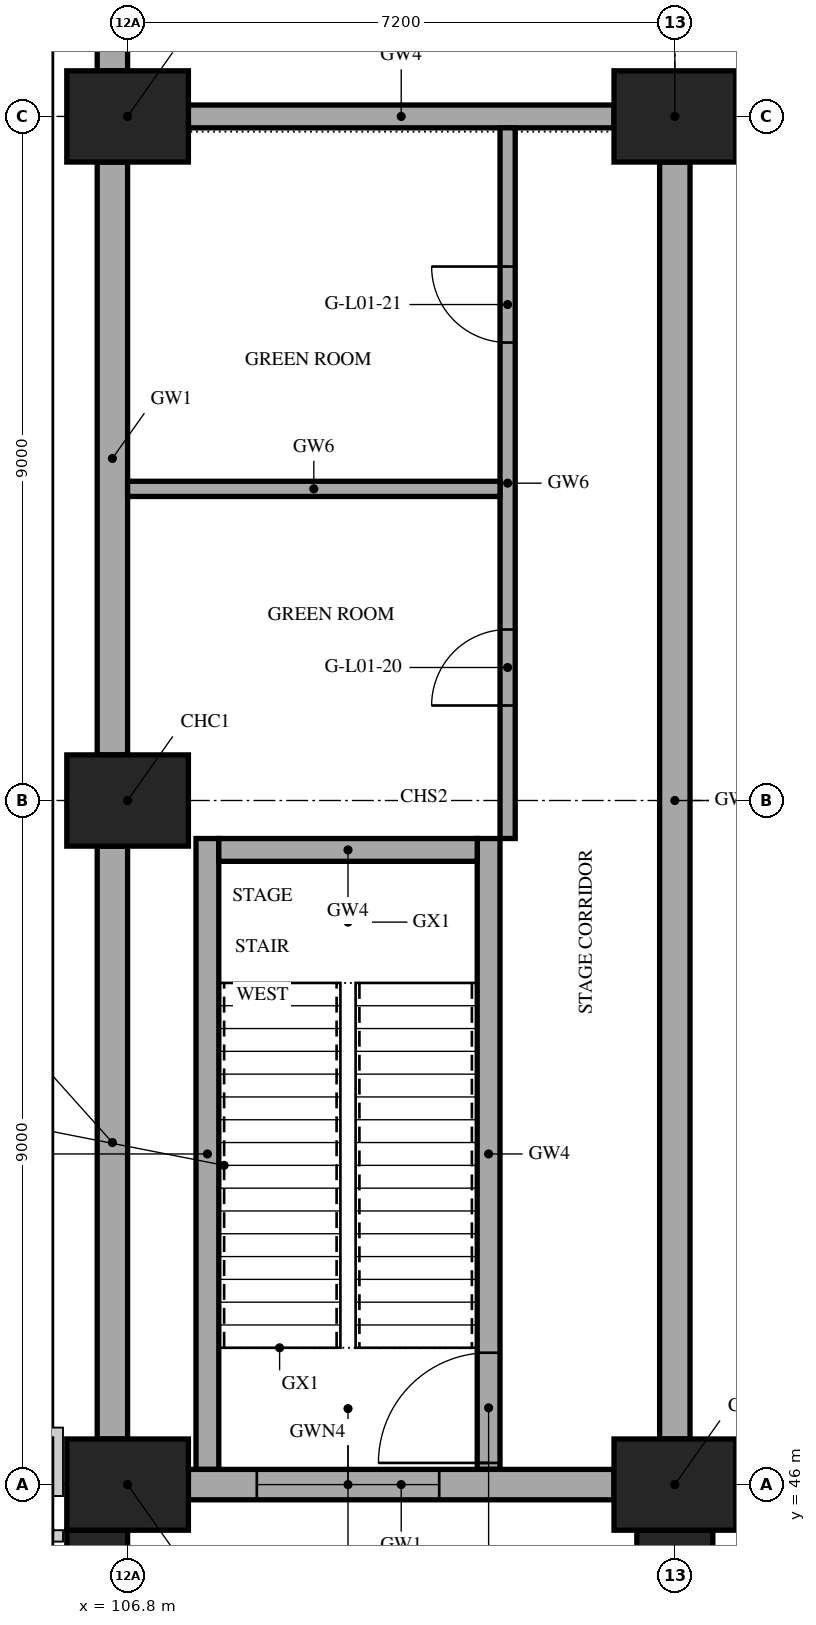
"""IFC4 building model, lengths in metres.
Left out: names, types, materials, properties, quantities, classifications, styles, units other than length and angle.
Written with IfcOpenShell. Run it as: python <this file> out.ifc"""

import sys

from ifc_helpers import new_model, si_unit, direction, frame, frame_2d, origin, origin_2d, place, context, subcontext, project, spatial, rectangle, extrude, element, fill, save


model = new_model("IFC4")
c1 = context("Model", 3, precision=1e-05, world=origin(), true_north=direction((0.0, 1.0)))
c2 = subcontext(c1, "Body", "Model", "MODEL_VIEW")
j1 = project(units=[si_unit("LENGTHUNIT", "METRE"), si_unit("PLANEANGLEUNIT", "RADIAN")], contexts=[c1])
p1 = place(None, origin())
s1 = spatial("IfcSite", under=j1, at=p1, CompositionType="ELEMENT")
p2 = place(p1, origin())
s2 = spatial("IfcBuilding", under=s1, at=p2, CompositionType="ELEMENT")
p3 = place(p2, frame((0.0, 0.0, 5.0)))
s3 = spatial("IfcBuildingStorey", under=s2, at=p3, CompositionType="ELEMENT", Elevation=5.0)
p4 = place(p3, frame((106.4, 44.9, 0.0), z_axis=(0.0, 0.0, 1.0), x_axis=(1.0, 0.0, 0.0)))
e1 = element("IfcColumn", 1, at=p4, inside=s3, PredefinedType="COLUMN", context=c2, shape_type="SweptSolid", body=[
    extrude(rectangle(XDim=0.8, YDim=1.0, at=origin_2d()), origin(), (0.0, 0.0, 1.0), 5.0),
])
p5 = place(p3, frame((114.0, 44.9, 0.0), z_axis=(0.0, 0.0, 1.0), x_axis=(1.0, 0.0, 0.0)))
e2 = element("IfcColumn", 2, at=p5, inside=s3, PredefinedType="COLUMN", context=c2, shape_type="SweptSolid", body=[
    extrude(rectangle(XDim=1.0, YDim=1.0, at=origin_2d()), origin(), (0.0, 0.0, 1.0), 5.0),
])
for number, where, z_axis, x_axis in (
    (3, (106.8, 46.0, 0.0), (0.0, 0.0, 1.0), (1.0, 0.0, 0.0)),
    (4, (114.0, 46.0, 0.0), (0.0, 0.0, 1.0), (1.0, 0.0, 0.0)),
    (5, (106.8, 55.0, 0.0), (0.0, 0.0, 1.0), (1.0, 0.0, 0.0)),
    (6, (106.8, 64.0, 0.0), (0.0, 0.0, 1.0), (1.0, 0.0, 0.0)),
    (7, (114.0, 64.0, 0.0), (0.0, 0.0, 1.0), (1.0, 0.0, 0.0)),
):
    element("IfcColumn", number, at=place(p3, frame(where, z_axis=z_axis, x_axis=x_axis)), inside=s3, PredefinedType="COLUMN", context=c2, shape_type="SweptSolid", body=[
        extrude(rectangle(XDim=1.6, YDim=1.2, at=origin_2d()), origin(), (0.0, 0.0, 1.0), 5.0),
    ])
p6 = place(p3, frame((114.0, 46.6, 0.0), z_axis=(0.0, 0.0, 1.0), x_axis=(0.0, 1.0, 0.0)))
e8 = element("IfcWall", 8, at=p6, inside=s3, PredefinedType="SHEAR", context=c2, shape_type="SweptSolid", body=[
    extrude(rectangle(XDim=16.8, YDim=0.4, at=frame_2d((8.4, 0.0))), origin(), (0.0, 0.0, 1.0), 5.0),
])
p7 = place(p3, frame((107.6, 64.0, 0.0), z_axis=(0.0, 0.0, 1.0), x_axis=(1.0, 0.0, 0.0)))
e9 = element("IfcWall", 9, at=p7, inside=s3, PredefinedType="SHEAR", context=c2, shape_type="SweptSolid", body=[
    extrude(rectangle(XDim=5.6, YDim=0.3, at=frame_2d((2.8, 0.0))), origin(), (0.0, 0.0, 1.0), 5.0),
])
p8 = place(p3, frame((107.85, 46.2, 0.0), z_axis=(0.0, 0.0, 1.0), x_axis=(0.0, 1.0, 0.0)))
e10 = element("IfcWall", 10, at=p8, inside=s3, PredefinedType="SHEAR", context=c2, shape_type="SweptSolid", body=[
    extrude(rectangle(XDim=8.3, YDim=0.3, at=frame_2d((4.15, 0.0))), origin(), (0.0, 0.0, 1.0), 5.0),
])
p9 = place(p3, frame((111.55, 46.2, 0.0), z_axis=(0.0, 0.0, 1.0), x_axis=(0.0, 1.0, 0.0)))
e11 = element("IfcWall", 11, at=p9, inside=s3, PredefinedType="SHEAR", context=c2, shape_type="SweptSolid", body=[
    extrude(rectangle(XDim=8.3, YDim=0.3, at=frame_2d((4.15, 0.0))), origin(), (0.0, 0.0, 1.0), 5.0),
])
p10 = place(p9, frame((0.085, 0.0, 0.0)))
e12 = element("IfcOpeningElement", 12, at=p10, cuts=e11, PredefinedType="OPENING", context=c2, shape_type="SweptSolid", body=[
    extrude(rectangle(XDim=1.45, YDim=2.1, at=frame_2d((0.725, 1.05))), frame((0.0, 0.16, 0.0), z_axis=(0.0, -1.0, 0.0), x_axis=(1.0, 0.0, 0.0)), (0.0, 0.0, 1.0), 0.32),
])
p11 = place(p3, frame((108.0, 54.35, 0.0), z_axis=(0.0, 0.0, 1.0), x_axis=(1.0, 0.0, 0.0)))
e13 = element("IfcWall", 13, at=p11, inside=s3, PredefinedType="SHEAR", context=c2, shape_type="SweptSolid", body=[
    extrude(rectangle(XDim=3.4, YDim=0.3, at=frame_2d((1.7, 0.0))), origin(), (0.0, 0.0, 1.0), 5.0),
])
for number, where, z_axis, x_axis in (
    (14, (106.6, 46.6, 0.0), (0.0, 0.0, 1.0), (0.0, 1.0, 0.0)),
    (15, (106.6, 55.6, 0.0), (0.0, 0.0, 1.0), (0.0, 1.0, 0.0)),
    (16, (106.6, 64.6, 0.0), (0.0, 0.0, 1.0), (0.0, 1.0, 0.0)),
):
    element("IfcWall", number, at=place(p3, frame(where, z_axis=z_axis, x_axis=x_axis)), inside=s3, PredefinedType="SOLIDWALL", context=c2, shape_type="SweptSolid", body=[
        extrude(rectangle(XDim=7.8, YDim=0.4, at=frame_2d((3.9, 0.0))), origin(), (0.0, 0.0, 1.0), 5.0),
    ])
p12 = place(p3, frame((107.6, 46.0, 0.0), z_axis=(0.0, 0.0, 1.0), x_axis=(1.0, 0.0, 0.0)))
e17 = element("IfcWall", 17, at=p12, inside=s3, PredefinedType="SOLIDWALL", context=c2, shape_type="SweptSolid", body=[
    extrude(rectangle(XDim=5.6, YDim=0.4, at=frame_2d((2.8, 0.0))), origin(), (0.0, 0.0, 1.0), 5.0),
])
p13 = place(p12, frame((0.9, 0.0, 1.2)))
e18 = element("IfcOpeningElement", 18, at=p13, cuts=e17, PredefinedType="OPENING", context=c2, shape_type="SweptSolid", body=[
    extrude(rectangle(XDim=2.4, YDim=1.8, at=frame_2d((1.2, 0.9))), frame((0.0, 0.21, 0.0), z_axis=(0.0, -1.0, 0.0), x_axis=(1.0, 0.0, 0.0)), (0.0, 0.0, 1.0), 0.42),
])
p14 = place(p3, frame((111.8, 54.5, 0.0), z_axis=(0.0, 0.0, 1.0), x_axis=(0.0, 1.0, 0.0)))
e19 = element("IfcWall", 19, at=p14, inside=s3, PredefinedType="PARTITIONING", context=c2, shape_type="SweptSolid", body=[
    extrude(rectangle(XDim=9.35, YDim=0.2, at=frame_2d((4.675, 0.0))), origin(), (0.0, 0.0, 1.0), 4.7),
])
p15 = place(p14, frame((1.75, 0.0, 0.0)))
e20 = element("IfcOpeningElement", 20, at=p15, cuts=e19, PredefinedType="OPENING", context=c2, shape_type="SweptSolid", body=[
    extrude(rectangle(XDim=1.0, YDim=2.1, at=frame_2d((0.5, 1.05))), frame((0.0, 0.11, 0.0), z_axis=(0.0, -1.0, 0.0), x_axis=(1.0, 0.0, 0.0)), (0.0, 0.0, 1.0), 0.22),
])
p16 = place(p14, frame((6.525, 0.0, 0.0)))
e21 = element("IfcOpeningElement", 21, at=p16, cuts=e19, PredefinedType="OPENING", context=c2, shape_type="SweptSolid", body=[
    extrude(rectangle(XDim=1.0, YDim=2.1, at=frame_2d((0.5, 1.05))), frame((0.0, 0.11, 0.0), z_axis=(0.0, -1.0, 0.0), x_axis=(1.0, 0.0, 0.0)), (0.0, 0.0, 1.0), 0.22),
])
p17 = place(p3, frame((106.8, 59.1, 0.0), z_axis=(0.0, 0.0, 1.0), x_axis=(1.0, 0.0, 0.0)))
e22 = element("IfcWall", 22, at=p17, inside=s3, PredefinedType="PARTITIONING", context=c2, shape_type="SweptSolid", body=[
    extrude(rectangle(XDim=4.9, YDim=0.2, at=frame_2d((2.45, 0.0))), origin(), (0.0, 0.0, 1.0), 4.7),
])
p18 = place(p13, origin())
e23 = element("IfcWindow", 23, at=p18, inside=s3, PartitioningType="SINGLE_PANEL", PredefinedType="WINDOW", context=c2, shape_type="SweptSolid", body=[
    extrude(rectangle(XDim=2.4, YDim=1.8, at=frame_2d((1.2, 0.9))), frame((0.0, 0.03, 0.0), z_axis=(0.0, -1.0, 0.0), x_axis=(1.0, 0.0, 0.0)), (0.0, 0.0, 1.0), 0.06),
])
fill(e18, e23)
p19 = place(p10, origin())
e24 = element("IfcDoor", 24, at=p19, inside=s3, OperationType="SINGLE_SWING_LEFT", PredefinedType="DOOR", context=c2, shape_type="SweptSolid", body=[
    extrude(rectangle(XDim=1.45, YDim=2.1, at=frame_2d((0.725, 1.05))), frame((0.0, 0.025, 0.0), z_axis=(0.0, -1.0, 0.0), x_axis=(1.0, 0.0, 0.0)), (0.0, 0.0, 1.0), 0.05),
])
fill(e12, e24)
p20 = place(p15, origin())
e25 = element("IfcDoor", 25, at=p20, inside=s3, OperationType="SINGLE_SWING_LEFT", PredefinedType="DOOR", context=c2, shape_type="SweptSolid", body=[
    extrude(rectangle(XDim=1.0, YDim=2.1, at=frame_2d((0.5, 1.05))), frame((0.0, 0.025, 0.0), z_axis=(0.0, -1.0, 0.0), x_axis=(1.0, 0.0, 0.0)), (0.0, 0.0, 1.0), 0.05),
])
fill(e20, e25)
p21 = place(p16, origin())
e26 = element("IfcDoor", 26, at=p21, inside=s3, OperationType="SINGLE_SWING_RIGHT", PredefinedType="DOOR", context=c2, shape_type="SweptSolid", body=[
    extrude(rectangle(XDim=1.0, YDim=2.1, at=frame_2d((0.5, 1.05))), frame((0.0, 0.025, 0.0), z_axis=(0.0, -1.0, 0.0), x_axis=(1.0, 0.0, 0.0)), (0.0, 0.0, 1.0), 0.05),
])
fill(e21, e26)
save(model, sys.argv[1])
